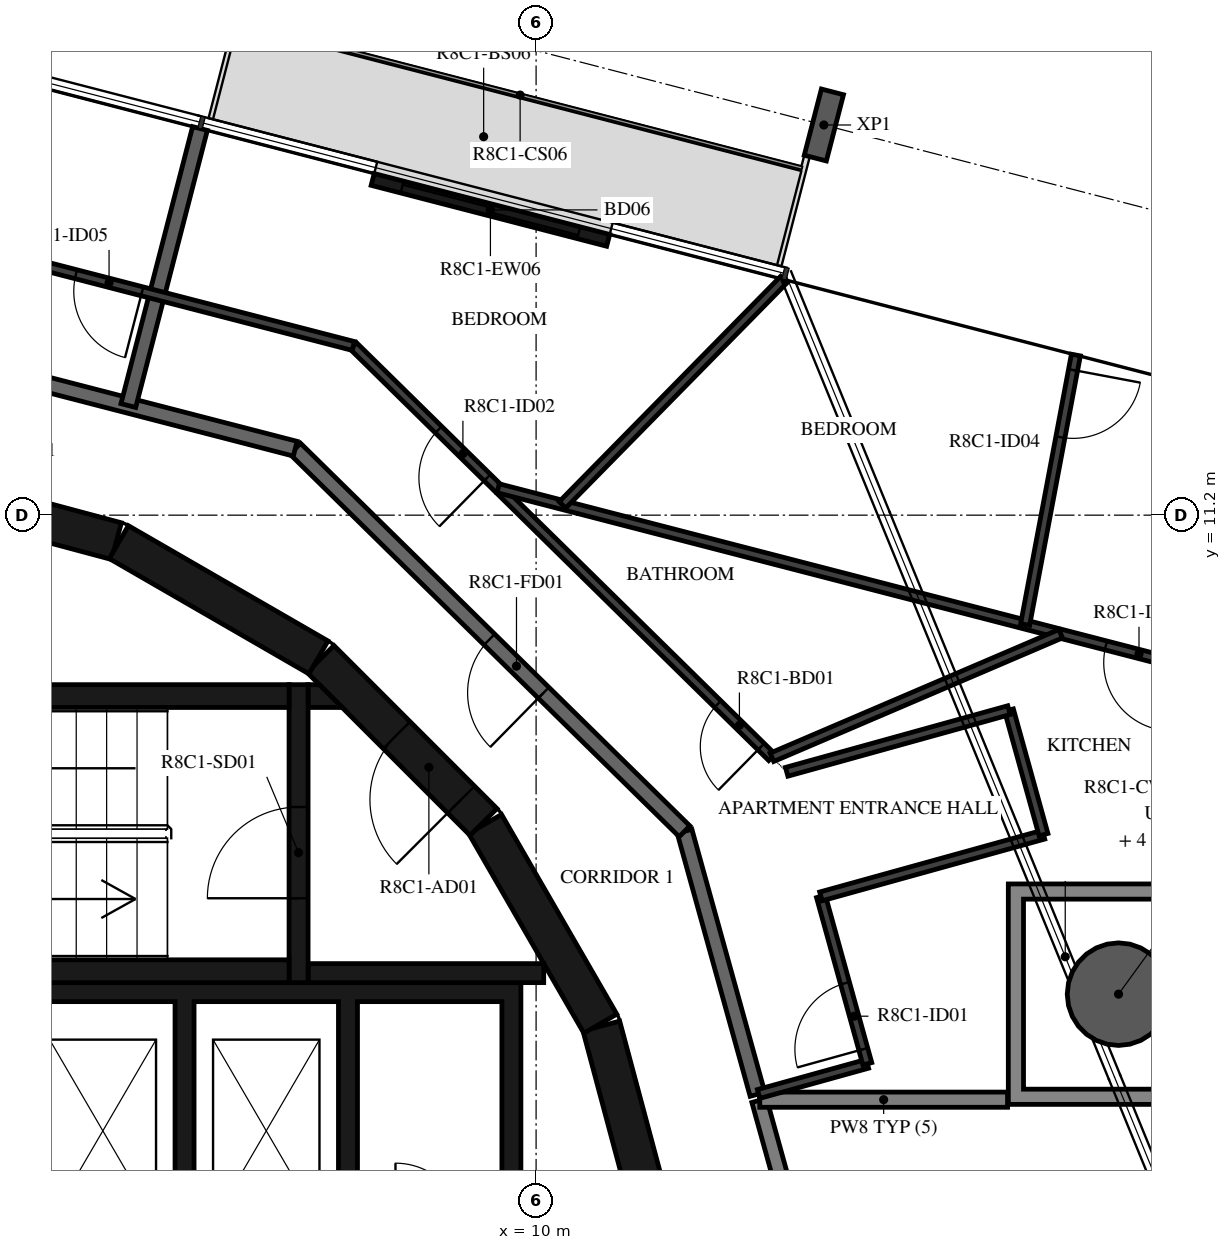
"""IFC4 building model, lengths in metres.
Left out: names, types, materials, properties, quantities, classifications, styles, units other than length and angle.
Written with IfcOpenShell. Run it as: python <this file> out.ifc"""

import sys

from ifc_helpers import new_model, si_unit, direction, frame, frame_2d, origin, origin_2d, place, context, subcontext, project, spatial, polyline, rectangle, hollow_circle, i_section, outline, extrude, element, fill, save


model = new_model("IFC4")
c1 = context("Model", 3, precision=1e-05, world=origin(), true_north=direction((0.0, 1.0)))
c2 = subcontext(c1, "Body", "Model", "MODEL_VIEW")
j1 = project(units=[si_unit("LENGTHUNIT", "METRE"), si_unit("PLANEANGLEUNIT", "RADIAN")], contexts=[c1])
p1 = place(None, origin())
s1 = spatial("IfcSite", under=j1, at=p1, CompositionType="ELEMENT")
p2 = place(p1, origin())
s2 = spatial("IfcBuilding", under=s1, at=p2, CompositionType="ELEMENT")
p3 = place(p2, frame((0.0, 0.0, 322.7)))
s3 = spatial("IfcBuildingStorey", under=s2, at=p3, CompositionType="ELEMENT", Elevation=322.7)
p4 = place(p3, frame((17.663, 4.898, -0.38), z_axis=(0.0, 0.0, 1.0), x_axis=(1.0, 0.0, 0.0)))
e1 = element("IfcColumn", 1, at=p4, inside=s3, PredefinedType="COLUMN", context=c2, shape_type="SweptSolid", body=[
    extrude(hollow_circle(Radius=0.675, WallThickness=0.03, at=origin_2d()), origin(), (0.0, 0.0, 1.0), 2.616),
])
p5 = place(p3, frame((13.786, 16.333, -0.38), z_axis=(0.0, 0.0, 1.0), x_axis=(0.968147663906, -0.250379913079, 0.0)))
e2 = element("IfcColumn", 2, at=p5, inside=s3, PredefinedType="COLUMN", context=c2, shape_type="SweptSolid", body=[
    extrude(i_section(OverallWidth=0.3, OverallDepth=0.9, WebThickness=0.019, FlangeThickness=0.035, FilletRadius=0.03, at=origin_2d()), origin(), (0.0, 0.0, 1.0), 2.616),
])
p6 = place(p3, frame((10.948, 14.815, 0.0), z_axis=(0.0, 0.0, 1.0), x_axis=(-0.968144998439, 0.250390219454, 0.0)))
e3 = element("IfcWall", 3, at=p6, inside=s3, PredefinedType="STANDARD", context=c2, shape_type="SweptSolid", body=[
    extrude(rectangle(XDim=3.2, YDim=0.16, at=frame_2d((1.6, 0.0))), origin(), (0.0, 0.0, 1.0), 3.05),
])
p7 = place(p6, frame((0.4, 0.0, 0.0)))
e4 = element("IfcOpeningElement", 4, at=p7, cuts=e3, PredefinedType="OPENING", context=c2, shape_type="SweptSolid", body=[
    extrude(rectangle(XDim=2.4, YDim=2.4, at=frame_2d((1.2, 1.2))), frame((0.0, 0.09, 0.0), z_axis=(0.0, -1.0, 0.0), x_axis=(1.0, 0.0, 0.0)), (0.0, 0.0, 1.0), 0.18),
])
for number, where, z_axis, x_axis in (
    (5, (11.643, 1.55, 0.0), (0.0, 0.0, 1.0), (-0.259, 0.966, 0.0)),
    (6, (10.845, 4.51, 0.0), (0.0, 0.0, 1.0), (-0.5, 0.866, 0.0)),
):
    element("IfcWall", number, at=place(p3, frame(where, z_axis=z_axis, x_axis=x_axis)), inside=s3, PredefinedType="SHEAR", context=c2, shape_type="SweptSolid", body=[
        extrude(rectangle(XDim=3.033, YDim=0.5, at=frame_2d((1.516, 0.0))), origin(), (0.0, 0.0, 1.0), 3.05),
    ])
p8 = place(p3, frame((9.308, 7.164, 0.0), z_axis=(0.0, 0.0, 1.0), x_axis=(-0.707106781187, 0.707106781187, 0.0)))
e7 = element("IfcWall", 7, at=p8, inside=s3, PredefinedType="SHEAR", context=c2, shape_type="SweptSolid", body=[
    extrude(rectangle(XDim=3.032, YDim=0.5, at=frame_2d((1.516, 0.0))), origin(), (0.0, 0.0, 1.0), 3.05),
])
p9 = place(p8, frame((0.416, 0.0, 0.0)))
e8 = element("IfcOpeningElement", 8, at=p9, cuts=e7, PredefinedType="OPENING", context=c2, shape_type="SweptSolid", body=[
    extrude(rectangle(XDim=1.2, YDim=2.1, at=frame_2d((0.6, 1.05))), frame((0.0, 0.26, 0.0), z_axis=(0.0, -1.0, 0.0), x_axis=(1.0, 0.0, 0.0)), (0.0, 0.0, 1.0), 0.52),
])
p10 = place(p3, frame((7.137, 9.329, 0.0), z_axis=(0.0, 0.0, 1.0), x_axis=(-0.865975092491, 0.500087131594, 0.0)))
e9 = element("IfcWall", 9, at=p10, inside=s3, PredefinedType="SHEAR", context=c2, shape_type="SweptSolid", body=[
    extrude(rectangle(XDim=3.033, YDim=0.5, at=frame_2d((1.516, 0.0))), origin(), (0.0, 0.0, 1.0), 3.05),
])
p11 = place(p3, frame((4.479, 10.858, 0.0), z_axis=(0.0, 0.0, 1.0), x_axis=(-0.965948410781, 0.258734743916, 0.0)))
e10 = element("IfcWall", 10, at=p11, inside=s3, PredefinedType="SHEAR", context=c2, shape_type="SweptSolid", body=[
    extrude(rectangle(XDim=3.033, YDim=0.5, at=frame_2d((1.516, 0.0))), origin(), (0.0, 0.0, 1.0), 3.05),
])
p12 = place(p11, frame((1.066, 0.0, 0.0)))
e11 = element("IfcOpeningElement", 11, at=p12, cuts=e10, PredefinedType="OPENING", context=c2, shape_type="SweptSolid", body=[
    extrude(rectangle(XDim=0.9, YDim=2.1, at=frame_2d((0.45, 1.05))), frame((0.0, 0.26, 0.0), z_axis=(0.0, -1.0, 0.0), x_axis=(1.0, 0.0, 0.0)), (0.0, 0.0, 1.0), 0.52),
])
for number, where, z_axis, x_axis in (
    (12, (0.0, 5.2, 0.0), (0.0, 0.0, 1.0), (1.0, 0.0, 0.0)),
    (13, (0.0, 8.82, 0.0), (0.0, 0.0, 1.0), (1.0, 0.0, 0.0)),
):
    element("IfcWall", number, at=place(p3, frame(where, z_axis=z_axis, x_axis=x_axis)), inside=s3, PredefinedType="SHEAR", context=c2, shape_type="SweptSolid", body=[
        extrude(rectangle(XDim=6.75, YDim=0.3, at=frame_2d((3.375, 0.0))), origin(), (0.0, 0.0, 1.0), 3.05),
    ])
p13 = place(p3, frame((6.875, 5.05, 0.0), z_axis=(0.0, 0.0, 1.0), x_axis=(0.0, 1.0, 0.0)))
e14 = element("IfcWall", 14, at=p13, inside=s3, PredefinedType="SHEAR", context=c2, shape_type="SweptSolid", body=[
    extrude(rectangle(XDim=3.92, YDim=0.25, at=frame_2d((1.96, 0.0))), origin(), (0.0, 0.0, 1.0), 3.05),
])
p14 = place(p13, frame((1.11, 0.0, 0.0)))
e15 = element("IfcOpeningElement", 15, at=p14, cuts=e14, PredefinedType="OPENING", context=c2, shape_type="SweptSolid", body=[
    extrude(rectangle(XDim=1.2, YDim=2.1, at=frame_2d((0.6, 1.05))), frame((0.0, 0.135, 0.0), z_axis=(0.0, -1.0, 0.0), x_axis=(1.0, 0.0, 0.0)), (0.0, 0.0, 1.0), 0.27),
])
p15 = place(p3, frame((7.0, 5.175, 0.0), z_axis=(0.0, 0.0, 1.0), x_axis=(1.0, 0.0, 0.0)))
e16 = element("IfcWall", 16, at=p15, inside=s3, PredefinedType="SHEAR", context=c2, shape_type="SweptSolid", body=[
    extrude(rectangle(XDim=3.1, YDim=0.25, at=frame_2d((1.55, 0.0))), origin(), (0.0, 0.0, 1.0), 3.05),
])
p16 = place(p3, origin())
e17 = element("IfcWall", 17, at=p16, inside=s3, PredefinedType="SHEAR", context=c2, shape_type="SweptSolid", body=[
    extrude(outline(polyline([(7.448, 8.67), (7.0, 8.67), (7.0, 8.97), (7.148, 8.97), (7.448, 8.67)])), origin(), (0.0, 0.0, 1.0), 3.05),
])
p17 = place(p3, origin())
e18 = element("IfcWall", 18, at=p17, inside=s3, PredefinedType="SHEAR", context=c2, shape_type="SweptSolid", body=[
    extrude(outline(polyline([(-9.8, 1.9), (-9.55, 1.9), (-9.55, 4.8), (-5.5, 4.8), (-5.5, 1.9), (-5.25, 1.9), (-5.25, 4.8), (3.1, 4.8), (3.1, 1.9), (3.35, 1.9), (3.35, 4.8), (5.25, 4.8), (5.25, 1.9), (5.5, 1.9), (5.5, 4.8), (7.4, 4.8), (7.4, 1.9), (7.65, 1.9), (7.65, 4.8), (9.55, 4.8), (9.55, 1.9), (9.8, 1.9), (9.8, 4.8), (9.8, 5.05), (-9.8, 5.05), (-9.8, 4.8), (-9.8, 1.9)])), origin(), (0.0, 0.0, 1.0), 3.05),
])
p18 = place(p3, frame((13.872, 0.121, 0.0), z_axis=(0.0, 0.0, 1.0), x_axis=(-0.267291928416, 0.963615600228, 0.0)))
e19 = element("IfcWall", 19, at=p18, inside=s3, PredefinedType="STANDARD", context=c2, shape_type="SweptSolid", body=[
    extrude(rectangle(XDim=3.507, YDim=0.2, at=frame_2d((1.753, 0.0))), origin(), (0.0, 0.0, 1.0), 3.05),
])
p19 = place(p3, frame((12.913, 3.581, 0.0), z_axis=(0.0, 0.0, 1.0), x_axis=(-0.267223005422, 0.963634715737, 0.0)))
e20 = element("IfcWall", 20, at=p19, inside=s3, PredefinedType="STANDARD", context=c2, shape_type="SweptSolid", body=[
    extrude(rectangle(XDim=3.591, YDim=0.2, at=frame_2d((1.795, 0.0))), origin(), (0.0, 0.0, 1.0), 3.05),
])
p20 = place(p3, frame((11.953, 7.041, 0.0), z_axis=(0.0, 0.0, 1.0), x_axis=(-0.713250549143, 0.70090916255, 0.0)))
e21 = element("IfcWall", 21, at=p20, inside=s3, PredefinedType="STANDARD", context=c2, shape_type="SweptSolid", body=[
    extrude(rectangle(XDim=7.181, YDim=0.2, at=frame_2d((3.59, 0.0))), origin(), (0.0, 0.0, 1.0), 3.05),
])
p21 = place(p20, frame((2.6, 0.0, 0.0)))
e22 = element("IfcOpeningElement", 22, at=p21, cuts=e21, PredefinedType="OPENING", context=c2, shape_type="SweptSolid", body=[
    extrude(rectangle(XDim=1.0, YDim=2.1, at=frame_2d((0.5, 1.05))), frame((0.0, 0.11, 0.0), z_axis=(0.0, -1.0, 0.0), x_axis=(1.0, 0.0, 0.0)), (0.0, 0.0, 1.0), 0.22),
])
p22 = place(p3, frame((6.831, 12.074, 0.0), z_axis=(0.0, 0.0, 1.0), x_axis=(-0.968144780225, 0.250391063186, 0.0)))
e23 = element("IfcWall", 23, at=p22, inside=s3, PredefinedType="STANDARD", context=c2, shape_type="SweptSolid", body=[
    extrude(rectangle(XDim=7.181, YDim=0.2, at=frame_2d((3.591, 0.0))), origin(), (0.0, 0.0, 1.0), 3.05),
])
p23 = place(p3, frame((16.203, 3.51, 0.0), z_axis=(0.0, 0.0, 1.0), x_axis=(-1.0, 0.0, 0.0)))
e24 = element("IfcWall", 24, at=p23, inside=s3, PredefinedType="STANDARD", context=c2, shape_type="SweptSolid", body=[
    extrude(rectangle(XDim=3.26, YDim=0.2, at=frame_2d((1.63, 0.0))), origin(), (0.0, 0.0, 1.0), 3.05),
])
p24 = place(p3, frame((5.578, 16.287, 0.0), z_axis=(0.0, 0.0, 1.0), x_axis=(-0.250385965992, -0.968146098497, 0.0)))
e25 = element("IfcWall", 25, at=p24, inside=s3, PredefinedType="STANDARD", context=c2, shape_type="SweptSolid", body=[
    extrude(rectangle(XDim=3.765, YDim=0.2, at=frame_2d((1.882, 0.0))), origin(), (0.0, 0.0, 1.0), 3.05),
])
p25 = place(p3, frame((12.927, 3.585, 0.0), z_axis=(0.0, 0.0, 1.0), x_axis=(0.963616756608, 0.26728775951, 0.0)))
e26 = element("IfcWall", 26, at=p25, inside=s3, PredefinedType="PARTITIONING", context=c2, shape_type="SweptSolid", body=[
    extrude(rectangle(XDim=1.485, YDim=0.12, at=frame_2d((0.743, 0.0))), origin(), (0.0, 0.0, 1.0), 3.05),
])
p26 = place(p3, frame((14.358, 3.982, 0.0), z_axis=(0.0, 0.0, 1.0), x_axis=(-0.267263698345, 0.963623430364, 0.0)))
e27 = element("IfcWall", 27, at=p26, inside=s3, PredefinedType="PARTITIONING", context=c2, shape_type="SweptSolid", body=[
    extrude(rectangle(XDim=2.286, YDim=0.12, at=frame_2d((1.143, 0.0))), origin(), (0.0, 0.0, 1.0), 3.05),
])
p27 = place(p26, frame((0.2, 0.0, 0.0)))
e28 = element("IfcOpeningElement", 28, at=p27, cuts=e27, PredefinedType="OPENING", context=c2, shape_type="SweptSolid", body=[
    extrude(rectangle(XDim=0.9, YDim=2.1, at=frame_2d((0.45, 1.05))), frame((0.0, 0.07, 0.0), z_axis=(0.0, -1.0, 0.0), x_axis=(1.0, 0.0, 0.0)), (0.0, 0.0, 1.0), 0.14),
])
p28 = place(p3, frame((13.747, 6.184, 0.0), z_axis=(0.0, 0.0, 1.0), x_axis=(0.963620272151, 0.267275085073, 0.0)))
e29 = element("IfcWall", 29, at=p28, inside=s3, PredefinedType="PARTITIONING", context=c2, shape_type="SweptSolid", body=[
    extrude(rectangle(XDim=3.039, YDim=0.12, at=frame_2d((1.52, 0.0))), origin(), (0.0, 0.0, 1.0), 3.05),
])
p29 = place(p3, frame((16.676, 6.997, 0.0), z_axis=(0.0, 0.0, 1.0), x_axis=(-0.267258687102, 0.963624820233, 0.0)))
e30 = element("IfcWall", 30, at=p29, inside=s3, PredefinedType="PARTITIONING", context=c2, shape_type="SweptSolid", body=[
    extrude(rectangle(XDim=1.7, YDim=0.12, at=frame_2d((0.85, 0.0))), origin(), (0.0, 0.0, 1.0), 3.05),
])
p30 = place(p3, frame((16.221, 8.635, 0.0), z_axis=(0.0, 0.0, 1.0), x_axis=(-0.963616947452, -0.267287071484, 0.0)))
e31 = element("IfcWall", 31, at=p30, inside=s3, PredefinedType="PARTITIONING", context=c2, shape_type="SweptSolid", body=[
    extrude(rectangle(XDim=3.035, YDim=0.12, at=frame_2d((1.518, 0.0))), origin(), (0.0, 0.0, 1.0), 3.05),
])
p31 = place(p3, frame((13.103, 8.014, 0.0), z_axis=(0.0, 0.0, 1.0), x_axis=(-0.713261822754, 0.700897690253, 0.0)))
e32 = element("IfcWall", 32, at=p31, inside=s3, PredefinedType="PARTITIONING", context=c2, shape_type="SweptSolid", body=[
    extrude(rectangle(XDim=7.721, YDim=0.12, at=frame_2d((3.86, 0.0))), origin(), (0.0, 0.0, 1.0), 3.05),
])
p32 = place(p31, frame((0.2, 0.0, 0.0)))
e33 = element("IfcOpeningElement", 33, at=p32, cuts=e32, PredefinedType="OPENING", context=c2, shape_type="SweptSolid", body=[
    extrude(rectangle(XDim=0.8, YDim=2.1, at=frame_2d((0.4, 1.05))), frame((0.0, 0.07, 0.0), z_axis=(0.0, -1.0, 0.0), x_axis=(1.0, 0.0, 0.0)), (0.0, 0.0, 1.0), 0.14),
])
p33 = place(p31, frame((5.25, 0.0, 0.0)))
e34 = element("IfcOpeningElement", 34, at=p33, cuts=e32, PredefinedType="OPENING", context=c2, shape_type="SweptSolid", body=[
    extrude(rectangle(XDim=0.9, YDim=2.1, at=frame_2d((0.45, 1.05))), frame((0.0, 0.07, 0.0), z_axis=(0.0, -1.0, 0.0), x_axis=(1.0, 0.0, 0.0)), (0.0, 0.0, 1.0), 0.14),
])
p34 = place(p3, frame((7.596, 13.426, 0.0), z_axis=(0.0, 0.0, 1.0), x_axis=(-0.968146656033, 0.250383810203, 0.0)))
e35 = element("IfcWall", 35, at=p34, inside=s3, PredefinedType="PARTITIONING", context=c2, shape_type="SweptSolid", body=[
    extrude(rectangle(XDim=7.985, YDim=0.12, at=frame_2d((3.992, 0.0))), origin(), (0.0, 0.0, 1.0), 3.05),
])
p35 = place(p34, frame((2.87, 0.0, 0.0)))
e36 = element("IfcOpeningElement", 36, at=p35, cuts=e35, PredefinedType="OPENING", context=c2, shape_type="SweptSolid", body=[
    extrude(rectangle(XDim=0.9, YDim=2.1, at=frame_2d((0.45, 1.05))), frame((0.0, 0.07, 0.0), z_axis=(0.0, -1.0, 0.0), x_axis=(1.0, 0.0, 0.0)), (0.0, 0.0, 1.0), 0.14),
])
p36 = place(p3, frame((18.561, 9.211, 0.0), z_axis=(0.0, 0.0, 1.0), x_axis=(-0.968146475492, 0.250384508293, 0.0)))
e37 = element("IfcWall", 37, at=p36, inside=s3, PredefinedType="PARTITIONING", context=c2, shape_type="SweptSolid", body=[
    extrude(rectangle(XDim=9.359, YDim=0.12, at=frame_2d((4.679, 0.0))), origin(), (0.0, 0.0, 1.0), 3.05),
])
p37 = place(p36, frame((0.2, 0.0, 0.0)))
e38 = element("IfcOpeningElement", 38, at=p37, cuts=e37, PredefinedType="OPENING", context=c2, shape_type="SweptSolid", body=[
    extrude(rectangle(XDim=0.9, YDim=2.1, at=frame_2d((0.45, 1.05))), frame((0.0, 0.07, 0.0), z_axis=(0.0, -1.0, 0.0), x_axis=(1.0, 0.0, 0.0)), (0.0, 0.0, 1.0), 0.14),
])
p38 = place(p3, frame((16.902, 9.64, 0.0), z_axis=(0.0, 0.0, 1.0), x_axis=(-0.919371033545, -0.393391538647, 0.0)))
e39 = element("IfcWall", 39, at=p38, inside=s3, PredefinedType="PARTITIONING", context=c2, shape_type="SweptSolid", body=[
    extrude(rectangle(XDim=4.132, YDim=0.12, at=frame_2d((2.066, 0.0))), origin(), (0.0, 0.0, 1.0), 3.05),
])
p39 = place(p3, frame((17.102, 13.307, 0.0), z_axis=(0.0, 0.0, 1.0), x_axis=(-0.185134164105, -0.982713254862, 0.0)))
e40 = element("IfcWall", 40, at=p39, inside=s3, PredefinedType="PARTITIONING", context=c2, shape_type="SweptSolid", body=[
    extrude(rectangle(XDim=3.608, YDim=0.12, at=frame_2d((1.804, 0.0))), origin(), (0.0, 0.0, 1.0), 3.05),
])
p40 = place(p39, frame((0.2, 0.0, 0.0)))
e41 = element("IfcOpeningElement", 41, at=p40, cuts=e40, PredefinedType="OPENING", context=c2, shape_type="SweptSolid", body=[
    extrude(rectangle(XDim=0.9, YDim=2.1, at=frame_2d((0.45, 1.05))), frame((0.0, 0.07, 0.0), z_axis=(0.0, -1.0, 0.0), x_axis=(1.0, 0.0, 0.0)), (0.0, 0.0, 1.0), 0.14),
])
p41 = place(p3, frame((13.26, 14.3, 0.0), z_axis=(0.0, 0.0, 1.0), x_axis=(-0.700942858884, -0.713217434293, 0.0)))
e42 = element("IfcWall", 42, at=p41, inside=s3, PredefinedType="PARTITIONING", context=c2, shape_type="SweptSolid", body=[
    extrude(rectangle(XDim=4.157, YDim=0.12, at=frame_2d((2.079, 0.0))), origin(), (0.0, 0.0, 1.0), 3.05),
])
p42 = place(p3, origin())
e43 = element("IfcWall", 43, at=p42, inside=s3, PredefinedType="STANDARD", context=c2, shape_type="SweptSolid", body=[
    extrude(outline(polyline([(19.113, 6.348), (19.113, 3.448), (16.213, 3.448), (16.213, 6.348), (19.113, 6.348)]), holes=[polyline([(16.413, 3.648), (18.913, 3.648), (18.913, 6.148), (16.413, 6.148), (16.413, 3.648)])]), origin(), (0.0, 0.0, 1.0), 3.05),
])
p43 = place(p7, origin())
e44 = element("IfcDoor", 44, at=p43, inside=s3, OperationType="DOUBLE_DOOR_SLIDING", PredefinedType="DOOR", context=c2, shape_type="SweptSolid", body=[
    extrude(rectangle(XDim=2.4, YDim=2.4, at=frame_2d((1.2, 1.2))), frame((0.0, 0.025, 0.0), z_axis=(0.0, -1.0, 0.0), x_axis=(1.0, 0.0, 0.0)), (0.0, 0.0, 1.0), 0.05),
])
fill(e4, e44)
p44 = place(p14, origin())
e45 = element("IfcDoor", 45, at=p44, inside=s3, OperationType="SINGLE_SWING_LEFT", PredefinedType="DOOR", context=c2, shape_type="SweptSolid", body=[
    extrude(rectangle(XDim=1.2, YDim=2.1, at=frame_2d((0.6, 1.05))), frame((0.0, 0.025, 0.0), z_axis=(0.0, -1.0, 0.0), x_axis=(1.0, 0.0, 0.0)), (0.0, 0.0, 1.0), 0.05),
])
fill(e15, e45)
p45 = place(p9, origin())
e46 = element("IfcDoor", 46, at=p45, inside=s3, OperationType="SINGLE_SWING_RIGHT", PredefinedType="DOOR", context=c2, shape_type="SweptSolid", body=[
    extrude(rectangle(XDim=1.2, YDim=2.1, at=frame_2d((0.6, 1.05))), frame((0.0, 0.025, 0.0), z_axis=(0.0, -1.0, 0.0), x_axis=(1.0, 0.0, 0.0)), (0.0, 0.0, 1.0), 0.05),
])
fill(e8, e46)
p46 = place(p21, origin())
e47 = element("IfcDoor", 47, at=p46, inside=s3, OperationType="SINGLE_SWING_LEFT", PredefinedType="DOOR", context=c2, shape_type="SweptSolid", body=[
    extrude(rectangle(XDim=1.0, YDim=2.1, at=frame_2d((0.5, 1.05))), frame((0.0, 0.025, 0.0), z_axis=(0.0, -1.0, 0.0), x_axis=(1.0, 0.0, 0.0)), (0.0, 0.0, 1.0), 0.05),
])
fill(e22, e47)
p47 = place(p27, origin())
e48 = element("IfcDoor", 48, at=p47, inside=s3, OperationType="SINGLE_SWING_LEFT", PredefinedType="DOOR", context=c2, shape_type="SweptSolid", body=[
    extrude(rectangle(XDim=0.9, YDim=2.1, at=frame_2d((0.45, 1.05))), frame((0.0, 0.025, 0.0), z_axis=(0.0, -1.0, 0.0), x_axis=(1.0, 0.0, 0.0)), (0.0, 0.0, 1.0), 0.05),
])
fill(e28, e48)
p48 = place(p32, origin())
e49 = element("IfcDoor", 49, at=p48, inside=s3, OperationType="SINGLE_SWING_LEFT", PredefinedType="DOOR", context=c2, shape_type="SweptSolid", body=[
    extrude(rectangle(XDim=0.8, YDim=2.1, at=frame_2d((0.4, 1.05))), frame((0.0, 0.025, 0.0), z_axis=(0.0, -1.0, 0.0), x_axis=(1.0, 0.0, 0.0)), (0.0, 0.0, 1.0), 0.05),
])
fill(e33, e49)
p49 = place(p33, origin())
e50 = element("IfcDoor", 50, at=p49, inside=s3, OperationType="SINGLE_SWING_LEFT", PredefinedType="DOOR", context=c2, shape_type="SweptSolid", body=[
    extrude(rectangle(XDim=0.9, YDim=2.1, at=frame_2d((0.45, 1.05))), frame((0.0, 0.025, 0.0), z_axis=(0.0, -1.0, 0.0), x_axis=(1.0, 0.0, 0.0)), (0.0, 0.0, 1.0), 0.05),
])
fill(e34, e50)
p50 = place(p37, origin())
e51 = element("IfcDoor", 51, at=p50, inside=s3, OperationType="SINGLE_SWING_LEFT", PredefinedType="DOOR", context=c2, shape_type="SweptSolid", body=[
    extrude(rectangle(XDim=0.9, YDim=2.1, at=frame_2d((0.45, 1.05))), frame((0.0, 0.025, 0.0), z_axis=(0.0, -1.0, 0.0), x_axis=(1.0, 0.0, 0.0)), (0.0, 0.0, 1.0), 0.05),
])
fill(e38, e51)
p51 = place(p40, origin())
e52 = element("IfcDoor", 52, at=p51, inside=s3, OperationType="SINGLE_SWING_RIGHT", PredefinedType="DOOR", context=c2, shape_type="SweptSolid", body=[
    extrude(rectangle(XDim=0.9, YDim=2.1, at=frame_2d((0.45, 1.05))), frame((0.0, 0.025, 0.0), z_axis=(0.0, -1.0, 0.0), x_axis=(1.0, 0.0, 0.0)), (0.0, 0.0, 1.0), 0.05),
])
fill(e41, e52)
p52 = place(p35, origin())
e53 = element("IfcDoor", 53, at=p52, inside=s3, OperationType="SINGLE_SWING_LEFT", PredefinedType="DOOR", context=c2, shape_type="SweptSolid", body=[
    extrude(rectangle(XDim=0.9, YDim=2.1, at=frame_2d((0.45, 1.05))), frame((0.0, 0.025, 0.0), z_axis=(0.0, -1.0, 0.0), x_axis=(1.0, 0.0, 0.0)), (0.0, 0.0, 1.0), 0.05),
])
fill(e36, e53)
save(model, sys.argv[1])
